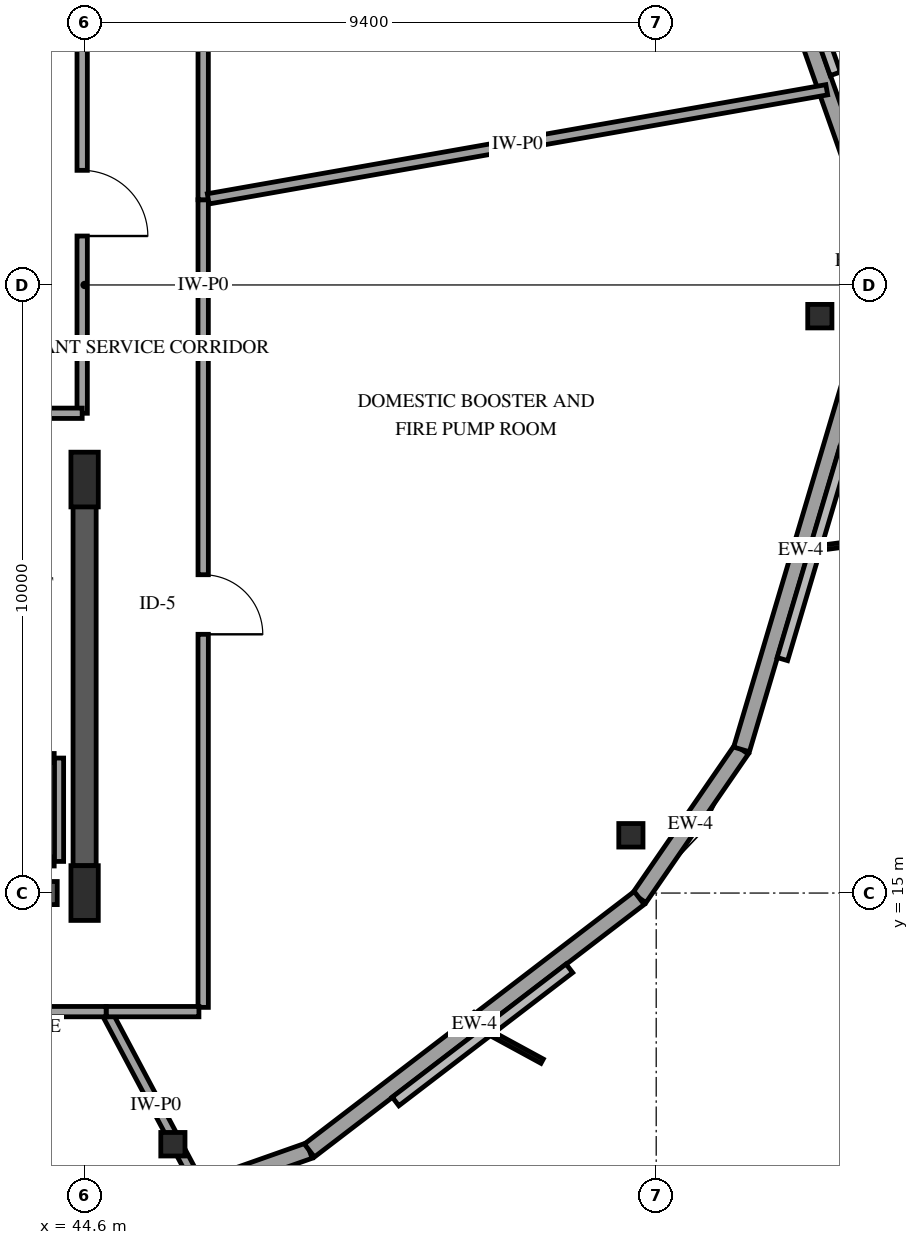
"""IFC4 building model, lengths in metres.
Left out: names, types, materials, properties, quantities, classifications, styles, units other than length and angle.
Written with IfcOpenShell. Run it as: python <this file> out.ifc"""

import sys

from ifc_helpers import new_model, si_unit, direction, frame, frame_2d, origin, origin_2d, place, context, subcontext, project, spatial, rectangle, i_section, extrude, element, fill, save


model = new_model("IFC4")
c1 = context("Model", 3, precision=1e-05, world=origin(), true_north=direction((0.0, 1.0)))
c2 = subcontext(c1, "Body", "Model", "MODEL_VIEW")
j1 = project(units=[si_unit("LENGTHUNIT", "METRE"), si_unit("PLANEANGLEUNIT", "RADIAN")], contexts=[c1])
p1 = place(None, origin())
s1 = spatial("IfcSite", under=j1, at=p1, CompositionType="ELEMENT")
p2 = place(p1, origin())
s2 = spatial("IfcBuilding", under=s1, at=p2, CompositionType="ELEMENT")
p3 = place(p2, frame((0.0, 0.0, 305.65)))
s3 = spatial("IfcBuildingStorey", under=s2, at=p3, CompositionType="ELEMENT", Elevation=305.65)
p4 = place(p3, frame((41.3, 15.0, 0.0), z_axis=(0.0, 0.0, 1.0), x_axis=(1.0, 0.0, 0.0)))
e1 = element("IfcWall", 1, at=p4, inside=s3, PredefinedType="SHEAR", context=c2, shape_type="SweptSolid", body=[
    extrude(rectangle(XDim=2.85, YDim=0.38, at=frame_2d((1.425, 0.0))), origin(), (0.0, 0.0, 1.0), 4.2),
])
p5 = place(p3, frame((44.6, 15.45, 0.0), z_axis=(0.0, 0.0, 1.0), x_axis=(0.0, 1.0, 0.0)))
e2 = element("IfcWall", 2, at=p5, inside=s3, PredefinedType="SHEAR", context=c2, shape_type="SweptSolid", body=[
    extrude(rectangle(XDim=6.35, YDim=0.38, at=frame_2d((3.175, 0.0))), origin(), (0.0, 0.0, 1.0), 4.2),
])
for number, where, z_axis, x_axis in (
    (3, (44.6, 15.0, 0.0), (0.0, 0.0, 1.0), (1.0, 0.0, 0.0)),
    (4, (44.6, 21.8, 0.0), (0.0, 0.0, 1.0), (1.0, 0.0, 0.0)),
):
    element("IfcColumn", number, at=place(p3, frame(where, z_axis=z_axis, x_axis=x_axis)), inside=s3, PredefinedType="PILASTER", context=c2, shape_type="SweptSolid", body=[
        extrude(rectangle(XDim=0.45, YDim=0.9, at=origin_2d()), origin(), (0.0, 0.0, 1.0), 4.2),
    ])
for number, where, z_axis, x_axis in (
    (5, (46.052, 10.869, 0.0), (0.0, 0.0, 1.0), (1.0, 0.0, 0.0)),
    (6, (53.584, 15.95, 0.0), (0.0, 0.0, 1.0), (1.0, 0.0, 0.0)),
    (7, (56.691, 24.487, 0.0), (0.0, 0.0, 1.0), (1.0, 0.0, 0.0)),
):
    element("IfcColumn", number, at=place(p3, frame(where, z_axis=z_axis, x_axis=x_axis)), inside=s3, PredefinedType="COLUMN", context=c2, shape_type="SweptSolid", body=[
        extrude(i_section(OverallWidth=0.398, OverallDepth=0.387, WebThickness=0.021, FlangeThickness=0.033, FilletRadius=0.038, at=origin_2d()), origin(), (0.0, 0.0, 1.0), 4.2),
    ])
for number, where, z_axis, x_axis in (
    (8, (45.499, 9.779, 0.0), (0.0, 0.0, 1.0), (0.943, 0.333, 0.0)),
    (9, (53.721, 14.919, 0.0), (0.0, 0.0, 1.0), (0.567, 0.824, 0.0)),
):
    element("IfcWall", number, at=place(p3, frame(where, z_axis=z_axis, x_axis=x_axis)), inside=s3, PredefinedType="SOLIDWALL", context=c2, shape_type="SweptSolid", body=[
        extrude(rectangle(XDim=2.967, YDim=0.27, at=frame_2d((1.483, 0.0))), origin(), (0.0, 0.0, 1.0), 3.195),
    ])
p6 = place(p3, frame((48.297, 10.766, 0.0), z_axis=(0.0, 0.0, 1.0), x_axis=(0.794020918326, 0.607890435244, 0.0)))
e10 = element("IfcWall", 10, at=p6, inside=s3, PredefinedType="SOLIDWALL", context=c2, shape_type="SweptSolid", body=[
    extrude(rectangle(XDim=6.831, YDim=0.27, at=frame_2d((3.416, 0.0))), origin(), (0.0, 0.0, 1.0), 3.195),
])
p7 = place(p3, frame((55.403, 17.362, 0.0), z_axis=(0.0, 0.0, 1.0), x_axis=(0.285019079127, 0.958521843535, 0.0)))
e11 = element("IfcWall", 11, at=p7, inside=s3, PredefinedType="SOLIDWALL", context=c2, shape_type="SweptSolid", body=[
    extrude(rectangle(XDim=6.831, YDim=0.27, at=frame_2d((3.416, 0.0))), origin(), (0.0, 0.0, 1.0), 3.195),
])
p8 = place(p3, frame((57.276, 26.875, 0.0), z_axis=(0.0, 0.0, 1.0), x_axis=(-0.332840681535, 0.942983075519, 0.0)))
e12 = element("IfcWall", 12, at=p8, inside=s3, PredefinedType="SOLIDWALL", context=c2, shape_type="SweptSolid", body=[
    extrude(rectangle(XDim=6.831, YDim=0.27, at=frame_2d((3.416, 0.0))), origin(), (0.0, 0.0, 1.0), 3.195),
])
for number, where, z_axis, x_axis in (
    (13, (42.9, 15.52, 0.0), (0.0, 0.0, 1.0), (1.0, 0.0, 0.0)),
    (14, (42.9, 17.22, 0.0), (0.0, 0.0, 1.0), (1.0, 0.0, 0.0)),
):
    element("IfcWall", number, at=place(p3, frame(where, z_axis=z_axis, x_axis=x_axis)), inside=s3, PredefinedType="PARTITIONING", context=c2, shape_type="SweptSolid", body=[
        extrude(rectangle(XDim=1.2, YDim=0.15, at=frame_2d((0.6, 0.0))), origin(), (0.0, 0.0, 1.0), 3.895),
    ])
p9 = place(p3, frame((44.18, 15.52, 0.0), z_axis=(0.0, 0.0, 1.0), x_axis=(0.0, 1.0, 0.0)))
e15 = element("IfcWall", 15, at=p9, inside=s3, PredefinedType="PARTITIONING", context=c2, shape_type="SweptSolid", body=[
    extrude(rectangle(XDim=1.7, YDim=0.15, at=frame_2d((0.85, 0.0))), origin(), (0.0, 0.0, 1.0), 3.895),
])
p10 = place(p3, frame((46.55, 26.401, 0.0), z_axis=(0.0, 0.0, 1.0), x_axis=(0.0, -1.0, 0.0)))
e16 = element("IfcWall", 16, at=p10, inside=s3, PredefinedType="PARTITIONING", context=c2, shape_type="SweptSolid", body=[
    extrude(rectangle(XDim=13.281, YDim=0.17, at=frame_2d((6.64, 0.0))), origin(), (0.0, 0.0, 1.0), 3.895),
])
p11 = place(p10, frame((6.166, 0.0, 0.0)))
e17 = element("IfcOpeningElement", 17, at=p11, cuts=e16, PredefinedType="OPENING", context=c2, shape_type="SweptSolid", body=[
    extrude(rectangle(XDim=0.98, YDim=2.15, at=frame_2d((0.49, 1.075))), frame((0.0, 0.095, 0.0), z_axis=(0.0, -1.0, 0.0), x_axis=(1.0, 0.0, 0.0)), (0.0, 0.0, 1.0), 0.19),
])
p12 = place(p3, frame((46.55, 36.88, 0.0), z_axis=(0.0, 0.0, 1.0), x_axis=(0.0, -1.0, 0.0)))
e18 = element("IfcWall", 18, at=p12, inside=s3, PredefinedType="PARTITIONING", context=c2, shape_type="SweptSolid", body=[
    extrude(rectangle(XDim=10.479, YDim=0.17, at=frame_2d((5.24, 0.0))), origin(), (0.0, 0.0, 1.0), 3.895),
])
p13 = place(p12, frame((4.765, 0.0, 0.0)))
e19 = element("IfcOpeningElement", 19, at=p13, cuts=e18, PredefinedType="OPENING", context=c2, shape_type="SweptSolid", body=[
    extrude(rectangle(XDim=0.98, YDim=2.15, at=frame_2d((0.49, 1.075))), frame((0.0, 0.095, 0.0), z_axis=(0.0, -1.0, 0.0), x_axis=(1.0, 0.0, 0.0)), (0.0, 0.0, 1.0), 0.19),
])
p14 = place(p3, frame((56.805, 28.21, 0.0), z_axis=(0.0, 0.0, 1.0), x_axis=(-0.984801637981, -0.173682854164, 0.0)))
e20 = element("IfcWall", 20, at=p14, inside=s3, PredefinedType="PARTITIONING", context=c2, shape_type="SweptSolid", body=[
    extrude(rectangle(XDim=10.329, YDim=0.17, at=frame_2d((5.165, 0.0))), origin(), (0.0, 0.0, 1.0), 3.895),
])
p15 = place(p3, frame((44.56, 29.8, 0.0), z_axis=(0.0, 0.0, 1.0), x_axis=(0.0, -1.0, 0.0)))
e21 = element("IfcWall", 21, at=p15, inside=s3, PredefinedType="PARTITIONING", context=c2, shape_type="SweptSolid", body=[
    extrude(rectangle(XDim=6.91, YDim=0.17, at=frame_2d((3.455, 0.0))), origin(), (0.0, 0.0, 1.0), 2.935),
])
p16 = place(p15, frame((2.915, 0.0, 0.0)))
e22 = element("IfcOpeningElement", 22, at=p16, cuts=e21, PredefinedType="OPENING", context=c2, shape_type="SweptSolid", body=[
    extrude(rectangle(XDim=1.08, YDim=2.15, at=frame_2d((0.54, 1.075))), frame((0.0, 0.095, 0.0), z_axis=(0.0, -1.0, 0.0), x_axis=(1.0, 0.0, 0.0)), (0.0, 0.0, 1.0), 0.19),
])
p17 = place(p3, frame((46.586, 9.979, 0.0), z_axis=(0.0, 0.0, 1.0), x_axis=(-0.469232216807, 0.883074813767, 0.0)))
e23 = element("IfcWall", 23, at=p17, inside=s3, PredefinedType="PARTITIONING", context=c2, shape_type="SweptSolid", body=[
    extrude(rectangle(XDim=3.478, YDim=0.17, at=frame_2d((1.739, 0.0))), origin(), (0.0, 0.0, 1.0), 3.19),
])
p18 = place(p3, frame((41.24, 22.89, 0.0), z_axis=(0.0, 0.0, 1.0), x_axis=(1.0, 0.0, 0.0)))
e24 = element("IfcWall", 24, at=p18, inside=s3, PredefinedType="PARTITIONING", context=c2, shape_type="SweptSolid", body=[
    extrude(rectangle(XDim=3.32, YDim=0.17, at=frame_2d((1.66, 0.0))), origin(), (0.0, 0.0, 1.0), 3.895),
])
p19 = place(p18, frame((1.12, 0.0, 0.0)))
e25 = element("IfcOpeningElement", 25, at=p19, cuts=e24, PredefinedType="OPENING", context=c2, shape_type="SweptSolid", body=[
    extrude(rectangle(XDim=1.08, YDim=2.15, at=frame_2d((0.54, 1.075))), frame((0.0, 0.095, 0.0), z_axis=(0.0, -1.0, 0.0), x_axis=(1.0, 0.0, 0.0)), (0.0, 0.0, 1.0), 0.19),
])
p20 = place(p3, frame((46.48, 13.05, 0.0), z_axis=(0.0, 0.0, 1.0), x_axis=(-1.0, 0.0, 0.0)))
e26 = element("IfcWall", 26, at=p20, inside=s3, PredefinedType="PARTITIONING", context=c2, shape_type="SweptSolid", body=[
    extrude(rectangle(XDim=1.526, YDim=0.17, at=frame_2d((0.763, 0.0))), origin(), (0.0, 0.0, 1.0), 3.895),
])
p21 = place(p3, frame((44.954, 13.05, 0.0), z_axis=(0.0, 0.0, 1.0), x_axis=(-1.0, 0.0, 0.0)))
e27 = element("IfcWall", 27, at=p21, inside=s3, PredefinedType="PARTITIONING", context=c2, shape_type="SweptSolid", body=[
    extrude(rectangle(XDim=9.221, YDim=0.17, at=frame_2d((4.611, 0.0))), origin(), (0.0, 0.0, 1.0), 3.895),
])
p22 = place(p21, frame((4.186, 0.0, 0.0)))
e28 = element("IfcOpeningElement", 28, at=p22, cuts=e27, PredefinedType="OPENING", context=c2, shape_type="SweptSolid", body=[
    extrude(rectangle(XDim=0.85, YDim=2.1, at=frame_2d((0.425, 1.05))), frame((0.0, 0.095, 0.0), z_axis=(0.0, -1.0, 0.0), x_axis=(1.0, 0.0, 0.0)), (0.0, 0.0, 1.0), 0.19),
])
p23 = place(p11, origin())
e29 = element("IfcDoor", 29, at=p23, inside=s3, OperationType="SINGLE_SWING_RIGHT", PredefinedType="DOOR", context=c2, shape_type="SweptSolid", body=[
    extrude(rectangle(XDim=0.98, YDim=2.15, at=frame_2d((0.49, 1.075))), frame((0.0, 0.025, 0.0), z_axis=(0.0, -1.0, 0.0), x_axis=(1.0, 0.0, 0.0)), (0.0, 0.0, 1.0), 0.05),
])
fill(e17, e29)
p24 = place(p16, origin())
e30 = element("IfcDoor", 30, at=p24, inside=s3, OperationType="SINGLE_SWING_RIGHT", PredefinedType="DOOR", context=c2, shape_type="SweptSolid", body=[
    extrude(rectangle(XDim=1.08, YDim=2.15, at=frame_2d((0.54, 1.075))), frame((0.0, 0.025, 0.0), z_axis=(0.0, -1.0, 0.0), x_axis=(1.0, 0.0, 0.0)), (0.0, 0.0, 1.0), 0.05),
])
fill(e22, e30)
save(model, sys.argv[1])
